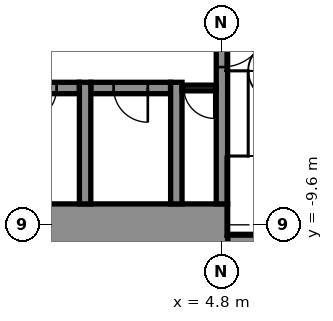
"""IFC4 building model, lengths in metres.
Left out: names, types, materials, properties, quantities, classifications, styles, units other than length and angle.
Written with IfcOpenShell. Run it as: python <this file> out.ifc"""

import sys

from ifc_helpers import new_model, si_unit, direction, frame, frame_2d, origin, place, context, subcontext, project, spatial, rectangle, extrude, element, fill, save


model = new_model("IFC4")
c1 = context("Model", 3, precision=1e-05, world=origin(), true_north=direction((0.0, 1.0)))
c2 = subcontext(c1, "Body", "Model", "MODEL_VIEW")
j1 = project(units=[si_unit("LENGTHUNIT", "METRE"), si_unit("PLANEANGLEUNIT", "RADIAN")], contexts=[c1])
p1 = place(None, origin())
s1 = spatial("IfcSite", under=j1, at=p1, CompositionType="ELEMENT")
p2 = place(p1, origin())
s2 = spatial("IfcBuilding", under=s1, at=p2, CompositionType="ELEMENT")
p3 = place(p2, frame((0.0, 0.0, 71.9)))
s3 = spatial("IfcBuildingStorey", under=s2, at=p3, CompositionType="ELEMENT", Elevation=71.9)
p4 = place(p3, frame((4.95, -10.0, -0.3), z_axis=(0.0, 0.0, 1.0), x_axis=(1.0, 0.0, 0.0)))
e1 = element("IfcWall", 1, at=p4, inside=s3, PredefinedType="STANDARD", context=c2, shape_type="SweptSolid", body=[
    extrude(rectangle(XDim=4.1, YDim=0.3, at=frame_2d((2.05, 0.0))), origin(), (0.0, 0.0, 1.0), 6.1),
])
p5 = place(p3, frame((-5.25, -9.6, -0.3), z_axis=(0.0, 0.0, 1.0), x_axis=(1.0, 0.0, 0.0)))
e2 = element("IfcWall", 2, at=p5, inside=s3, PredefinedType="SHEAR", context=c2, shape_type="SweptSolid", body=[
    extrude(rectangle(XDim=10.2, YDim=1.1, at=frame_2d((5.1, 0.0))), origin(), (0.0, 0.0, 1.0), 6.1),
])
p6 = place(p5, frame((0.6, 0.0, 0.3)))
e3 = element("IfcOpeningElement", 3, at=p6, cuts=e2, PredefinedType="OPENING", context=c2, shape_type="SweptSolid", body=[
    extrude(rectangle(XDim=0.9, YDim=2.1, at=frame_2d((0.45, 1.05))), frame((0.0, 0.56, 0.0), z_axis=(0.0, -1.0, 0.0), x_axis=(1.0, 0.0, 0.0)), (0.0, 0.0, 1.0), 1.12),
])
p7 = place(p3, frame((-1.05, -6.0, -0.3), z_axis=(0.0, 0.0, 1.0), x_axis=(1.0, 0.0, 0.0)))
e4 = element("IfcWall", 4, at=p7, inside=s3, PredefinedType="STANDARD", context=c2, shape_type="SweptSolid", body=[
    extrude(rectangle(XDim=2.1, YDim=0.3, at=frame_2d((1.05, 0.0))), origin(), (0.0, 0.0, 1.0), 6.1),
])
p8 = place(p7, frame((0.6, 0.0, 0.3)))
e5 = element("IfcOpeningElement", 5, at=p8, cuts=e4, PredefinedType="OPENING", context=c2, shape_type="SweptSolid", body=[
    extrude(rectangle(XDim=0.9, YDim=2.1, at=frame_2d((0.45, 1.05))), frame((0.0, 0.16, 0.0), z_axis=(0.0, -1.0, 0.0), x_axis=(1.0, 0.0, 0.0)), (0.0, 0.0, 1.0), 0.32),
])
p9 = place(p3, frame((1.35, -6.0, -0.3), z_axis=(0.0, 0.0, 1.0), x_axis=(1.0, 0.0, 0.0)))
e6 = element("IfcWall", 6, at=p9, inside=s3, PredefinedType="STANDARD", context=c2, shape_type="SweptSolid", body=[
    extrude(rectangle(XDim=2.1, YDim=0.3, at=frame_2d((1.05, 0.0))), origin(), (0.0, 0.0, 1.0), 6.1),
])
p10 = place(p9, frame((0.6, 0.0, 0.3)))
e7 = element("IfcOpeningElement", 7, at=p10, cuts=e6, PredefinedType="OPENING", context=c2, shape_type="SweptSolid", body=[
    extrude(rectangle(XDim=0.9, YDim=2.1, at=frame_2d((0.45, 1.05))), frame((0.0, 0.16, 0.0), z_axis=(0.0, -1.0, 0.0), x_axis=(1.0, 0.0, 0.0)), (0.0, 0.0, 1.0), 0.32),
])
for number, where, z_axis, x_axis in (
    (8, (1.2, -9.05, -0.3), (0.0, 0.0, 1.0), (0.0, 1.0, 0.0)),
    (9, (3.6, -9.05, -0.3), (0.0, 0.0, 1.0), (0.0, 1.0, 0.0)),
):
    element("IfcWall", number, at=place(p3, frame(where, z_axis=z_axis, x_axis=x_axis)), inside=s3, PredefinedType="STANDARD", context=c2, shape_type="SweptSolid", body=[
        extrude(rectangle(XDim=3.2, YDim=0.3, at=frame_2d((1.6, 0.0))), origin(), (0.0, 0.0, 1.0), 6.1),
    ])
p11 = place(p3, frame((4.8, -9.05, -0.3), z_axis=(0.0, 0.0, 1.0), x_axis=(0.0, 1.0, 0.0)))
e10 = element("IfcWall", 10, at=p11, inside=s3, PredefinedType="STANDARD", context=c2, shape_type="SweptSolid", body=[
    extrude(rectangle(XDim=6.8, YDim=0.3, at=frame_2d((3.4, 0.0))), origin(), (0.0, 0.0, 1.0), 6.1),
])
p12 = place(p11, frame((3.6, 0.0, 0.3)))
e11 = element("IfcOpeningElement", 11, at=p12, cuts=e10, PredefinedType="OPENING", context=c2, shape_type="SweptSolid", body=[
    extrude(rectangle(XDim=1.2, YDim=2.1, at=frame_2d((0.6, 1.05))), frame((0.0, 0.16, 0.0), z_axis=(0.0, -1.0, 0.0), x_axis=(1.0, 0.0, 0.0)), (0.0, 0.0, 1.0), 0.32),
])
p13 = place(p3, frame((3.75, -6.0, 0.0), z_axis=(0.0, 0.0, 1.0), x_axis=(1.0, 0.0, 0.0)))
e12 = element("IfcWall", 12, at=p13, inside=s3, PredefinedType="PARTITIONING", context=c2, shape_type="SweptSolid", body=[
    extrude(rectangle(XDim=0.9, YDim=0.15, at=frame_2d((0.45, 0.0))), origin(), (0.0, 0.0, 1.0), 5.8),
])
p14 = place(p13, frame((0.05, 0.0, 0.0)))
e13 = element("IfcOpeningElement", 13, at=p14, cuts=e12, PredefinedType="OPENING", context=c2, shape_type="SweptSolid", body=[
    extrude(rectangle(XDim=0.8, YDim=2.1, at=frame_2d((0.4, 1.05))), frame((0.0, 0.085, 0.0), z_axis=(0.0, -1.0, 0.0), x_axis=(1.0, 0.0, 0.0)), (0.0, 0.0, 1.0), 0.17),
])
p15 = place(p14, frame((0.8, 0.0, 0.0), z_axis=(0.0, 0.0, 1.0), x_axis=(-1.0, 0.0, 0.0)))
e14 = element("IfcDoor", 14, at=p15, inside=s3, OperationType="SINGLE_SWING_RIGHT", PredefinedType="DOOR", context=c2, shape_type="SweptSolid", body=[
    extrude(rectangle(XDim=0.8, YDim=2.1, at=frame_2d((0.4, 1.05))), frame((0.0, 0.025, 0.0), z_axis=(0.0, -1.0, 0.0), x_axis=(1.0, 0.0, 0.0)), (0.0, 0.0, 1.0), 0.05),
])
fill(e13, e14)
p16 = place(p12, frame((1.2, 0.0, 0.0), z_axis=(0.0, 0.0, 1.0), x_axis=(-1.0, 0.0, 0.0)))
e15 = element("IfcDoor", 15, at=p16, inside=s3, OperationType="SINGLE_SWING_RIGHT", PredefinedType="DOOR", context=c2, shape_type="SweptSolid", body=[
    extrude(rectangle(XDim=1.2, YDim=2.1, at=frame_2d((0.6, 1.05))), frame((0.0, 0.025, 0.0), z_axis=(0.0, -1.0, 0.0), x_axis=(1.0, 0.0, 0.0)), (0.0, 0.0, 1.0), 0.05),
])
fill(e11, e15)
p17 = place(p8, frame((0.9, 0.0, 0.0), z_axis=(0.0, 0.0, 1.0), x_axis=(-1.0, 0.0, 0.0)))
e16 = element("IfcDoor", 16, at=p17, inside=s3, OperationType="SINGLE_SWING_LEFT", PredefinedType="DOOR", context=c2, shape_type="SweptSolid", body=[
    extrude(rectangle(XDim=0.9, YDim=2.1, at=frame_2d((0.45, 1.05))), frame((0.0, 0.025, 0.0), z_axis=(0.0, -1.0, 0.0), x_axis=(1.0, 0.0, 0.0)), (0.0, 0.0, 1.0), 0.05),
])
fill(e5, e16)
p18 = place(p10, frame((0.9, 0.0, 0.0), z_axis=(0.0, 0.0, 1.0), x_axis=(-1.0, 0.0, 0.0)))
e17 = element("IfcDoor", 17, at=p18, inside=s3, OperationType="SINGLE_SWING_RIGHT", PredefinedType="DOOR", context=c2, shape_type="SweptSolid", body=[
    extrude(rectangle(XDim=0.9, YDim=2.1, at=frame_2d((0.45, 1.05))), frame((0.0, 0.025, 0.0), z_axis=(0.0, -1.0, 0.0), x_axis=(1.0, 0.0, 0.0)), (0.0, 0.0, 1.0), 0.05),
])
fill(e7, e17)
save(model, sys.argv[1])
